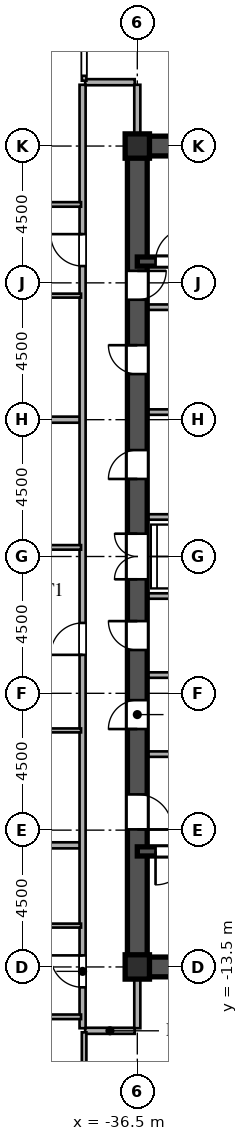
"""IFC4 building model, lengths in metres.
Left out: names, types, materials, properties, quantities, classifications, styles, units other than length and angle.
Written with IfcOpenShell. Run it as: python <this file> out.ifc"""

import sys

from ifc_helpers import new_model, si_unit, direction, frame, frame_2d, origin, origin_2d, place, context, subcontext, project, spatial, rectangle, i_section, extrude, source, transform, mapped, element, fill, save


model = new_model("IFC4")
c1 = context("Model", 3, precision=1e-05, world=origin(), true_north=direction((0.0, 1.0)))
c2 = subcontext(c1, "Body", "Model", "MODEL_VIEW")
j1 = project(units=[si_unit("LENGTHUNIT", "METRE"), si_unit("PLANEANGLEUNIT", "RADIAN")], contexts=[c1])
p1 = place(None, origin())
s1 = spatial("IfcSite", under=j1, at=p1, CompositionType="ELEMENT")
p2 = place(p1, origin())
s2 = spatial("IfcBuilding", under=s1, at=p2, CompositionType="ELEMENT")
p3 = place(p2, frame((0.0, 0.0, 69.3)))
s3 = spatial("IfcBuildingStorey", under=s2, at=p3, CompositionType="ELEMENT", Elevation=69.3)
m1 = source(origin(), c2, "Body", "SweptSolid", [
    extrude(i_section(OverallWidth=0.8, OverallDepth=0.8, WebThickness=0.032, FlangeThickness=0.05, at=origin_2d()), origin(), (0.0, 0.0, 1.0), 3.6),
])
for number, where, z_axis, x_axis in (
    (1, (-36.5, -13.5, 0.0), (0.0, 0.0, 1.0), (1.0, 0.0, 0.0)),
    (2, (-36.5, 13.5, 0.0), (0.0, 0.0, 1.0), (1.0, 0.0, 0.0)),
):
    element("IfcColumn", number, at=place(p3, frame(where, z_axis=z_axis, x_axis=x_axis)), inside=s3, PredefinedType="COLUMN", context=c2, shape_type="MappedRepresentation", body=[
        mapped(m1, transform((0.0, 0.0, 0.0), scale=1.0)),
    ])
for number, where, z_axis, x_axis in (
    (3, (-36.5, -13.5, 0.0), (0.0, 0.0, 1.0), (1.0, 0.0, 0.0)),
    (4, (-36.5, 13.5, 0.0), (0.0, 0.0, 1.0), (1.0, 0.0, 0.0)),
):
    element("IfcWall", number, at=place(p3, frame(where, z_axis=z_axis, x_axis=x_axis)), inside=s3, PredefinedType="SHEAR", context=c2, shape_type="SweptSolid", body=[
        extrude(rectangle(XDim=9.0, YDim=0.65, at=frame_2d((4.5, 0.0))), origin(), (0.0, 0.0, 1.0), 3.38),
    ])
p4 = place(p3, frame((-36.5, -13.65, 0.0), z_axis=(0.0, 0.0, 1.0), x_axis=(0.0, 1.0, 0.0)))
e5 = element("IfcWall", 5, at=p4, inside=s3, PredefinedType="SHEAR", context=c2, shape_type="SweptSolid", body=[
    extrude(rectangle(XDim=7.15, YDim=0.65, at=frame_2d((3.575, 0.0))), origin(), (0.0, 0.0, 1.0), 3.38),
])
p5 = place(p4, frame((4.675, 0.0, 0.0)))
e6 = element("IfcOpeningElement", 6, at=p5, cuts=e5, PredefinedType="OPENING", context=c2, shape_type="SweptSolid", body=[
    extrude(rectangle(XDim=1.15, YDim=2.2, at=frame_2d((0.575, 1.1))), frame((0.0, 0.335, 0.0), z_axis=(0.0, -1.0, 0.0), x_axis=(1.0, 0.0, 0.0)), (0.0, 0.0, 1.0), 0.67),
])
p6 = place(p3, frame((-36.5, -1.3, 0.0), z_axis=(0.0, 0.0, 1.0), x_axis=(0.0, 1.0, 0.0)))
e7 = element("IfcWall", 7, at=p6, inside=s3, PredefinedType="SHEAR", context=c2, shape_type="SweptSolid", body=[
    extrude(rectangle(XDim=2.6, YDim=0.65, at=frame_2d((1.3, 0.0))), origin(), (0.0, 0.0, 1.0), 3.38),
])
p7 = place(p6, frame((0.55, 0.0, 0.0)))
e8 = element("IfcOpeningElement", 8, at=p7, cuts=e7, PredefinedType="OPENING", context=c2, shape_type="SweptSolid", body=[
    extrude(rectangle(XDim=1.5, YDim=2.3, at=frame_2d((0.75, 1.15))), frame((0.0, 0.335, 0.0), z_axis=(0.0, -1.0, 0.0), x_axis=(1.0, 0.0, 0.0)), (0.0, 0.0, 1.0), 0.67),
])
p8 = place(p3, frame((-36.5, 8.2, 0.0), z_axis=(0.0, 0.0, 1.0), x_axis=(0.0, 1.0, 0.0)))
e9 = element("IfcWall", 9, at=p8, inside=s3, PredefinedType="SHEAR", context=c2, shape_type="SweptSolid", body=[
    extrude(rectangle(XDim=5.45, YDim=0.65, at=frame_2d((2.725, 0.0))), origin(), (0.0, 0.0, 1.0), 3.38),
])
p9 = place(p8, frame((0.245, 0.0, 0.0)))
e10 = element("IfcOpeningElement", 10, at=p9, cuts=e9, PredefinedType="OPENING", context=c2, shape_type="SweptSolid", body=[
    extrude(rectangle(XDim=0.95, YDim=2.15, at=frame_2d((0.475, 1.075))), frame((0.0, 0.335, 0.0), z_axis=(0.0, -1.0, 0.0), x_axis=(1.0, 0.0, 0.0)), (0.0, 0.0, 1.0), 0.67),
])
p10 = place(p3, frame((-36.5, -6.5, 0.0), z_axis=(0.0, 0.0, 1.0), x_axis=(0.0, 1.0, 0.0)))
e11 = element("IfcWall", 11, at=p10, inside=s3, PredefinedType="SHEAR", context=c2, shape_type="SweptSolid", body=[
    extrude(rectangle(XDim=2.6, YDim=0.65, at=frame_2d((1.3, 0.0))), origin(), (0.0, 0.0, 1.0), 3.38),
])
p11 = place(p10, frame((0.825, 0.0, 0.0)))
e12 = element("IfcOpeningElement", 12, at=p11, cuts=e11, PredefinedType="OPENING", context=c2, shape_type="SweptSolid", body=[
    extrude(rectangle(XDim=0.95, YDim=2.15, at=frame_2d((0.475, 1.075))), frame((0.0, 0.335, 0.0), z_axis=(0.0, -1.0, 0.0), x_axis=(1.0, 0.0, 0.0)), (0.0, 0.0, 1.0), 0.67),
])
p12 = place(p3, frame((-36.5, -3.9, 0.0), z_axis=(0.0, 0.0, 1.0), x_axis=(0.0, 1.0, 0.0)))
e13 = element("IfcWall", 13, at=p12, inside=s3, PredefinedType="SHEAR", context=c2, shape_type="SweptSolid", body=[
    extrude(rectangle(XDim=2.6, YDim=0.65, at=frame_2d((1.3, 0.0))), origin(), (0.0, 0.0, 1.0), 3.38),
])
p13 = place(p12, frame((0.825, 0.0, 0.0)))
e14 = element("IfcOpeningElement", 14, at=p13, cuts=e13, PredefinedType="OPENING", context=c2, shape_type="SweptSolid", body=[
    extrude(rectangle(XDim=0.95, YDim=2.15, at=frame_2d((0.475, 1.075))), frame((0.0, 0.335, 0.0), z_axis=(0.0, -1.0, 0.0), x_axis=(1.0, 0.0, 0.0)), (0.0, 0.0, 1.0), 0.67),
])
p14 = place(p3, frame((-36.5, 1.3, 0.0), z_axis=(0.0, 0.0, 1.0), x_axis=(0.0, 1.0, 0.0)))
e15 = element("IfcWall", 15, at=p14, inside=s3, PredefinedType="SHEAR", context=c2, shape_type="SweptSolid", body=[
    extrude(rectangle(XDim=3.45, YDim=0.65, at=frame_2d((1.725, 0.0))), origin(), (0.0, 0.0, 1.0), 3.38),
])
p15 = place(p14, frame((1.25, 0.0, 0.0)))
e16 = element("IfcOpeningElement", 16, at=p15, cuts=e15, PredefinedType="OPENING", context=c2, shape_type="SweptSolid", body=[
    extrude(rectangle(XDim=0.95, YDim=2.15, at=frame_2d((0.475, 1.075))), frame((0.0, 0.335, 0.0), z_axis=(0.0, -1.0, 0.0), x_axis=(1.0, 0.0, 0.0)), (0.0, 0.0, 1.0), 0.67),
])
p16 = place(p3, frame((-36.5, 4.75, 0.0), z_axis=(0.0, 0.0, 1.0), x_axis=(0.0, 1.0, 0.0)))
e17 = element("IfcWall", 17, at=p16, inside=s3, PredefinedType="SHEAR", context=c2, shape_type="SweptSolid", body=[
    extrude(rectangle(XDim=3.45, YDim=0.65, at=frame_2d((1.725, 0.0))), origin(), (0.0, 0.0, 1.0), 3.38),
])
p17 = place(p16, frame((1.25, 0.0, 0.0)))
e18 = element("IfcOpeningElement", 18, at=p17, cuts=e17, PredefinedType="OPENING", context=c2, shape_type="SweptSolid", body=[
    extrude(rectangle(XDim=0.95, YDim=2.15, at=frame_2d((0.475, 1.075))), frame((0.0, 0.335, 0.0), z_axis=(0.0, -1.0, 0.0), x_axis=(1.0, 0.0, 0.0)), (0.0, 0.0, 1.0), 0.67),
])
p18 = place(p3, frame((-36.5, -9.7, 0.0), z_axis=(0.0, 0.0, 1.0), x_axis=(1.0, 0.0, 0.0)))
e19 = element("IfcWall", 19, at=p18, inside=s3, PredefinedType="SHEAR", context=c2, shape_type="SweptSolid", body=[
    extrude(rectangle(XDim=9.0, YDim=0.3, at=frame_2d((4.5, 0.0))), origin(), (0.0, 0.0, 1.0), 3.38),
])
p19 = place(p18, frame((0.6, 0.0, 0.0)))
e20 = element("IfcOpeningElement", 20, at=p19, cuts=e19, PredefinedType="OPENING", context=c2, shape_type="SweptSolid", body=[
    extrude(rectangle(XDim=1.1, YDim=2.2, at=frame_2d((0.55, 1.1))), frame((0.0, 0.16, 0.0), z_axis=(0.0, -1.0, 0.0), x_axis=(1.0, 0.0, 0.0)), (0.0, 0.0, 1.0), 0.32),
])
p20 = place(p3, frame((-36.5, 9.7, 0.0), z_axis=(0.0, 0.0, 1.0), x_axis=(1.0, 0.0, 0.0)))
e21 = element("IfcWall", 21, at=p20, inside=s3, PredefinedType="SHEAR", context=c2, shape_type="SweptSolid", body=[
    extrude(rectangle(XDim=9.0, YDim=0.3, at=frame_2d((4.5, 0.0))), origin(), (0.0, 0.0, 1.0), 3.38),
])
p21 = place(p20, frame((0.6, 0.0, 0.0)))
e22 = element("IfcOpeningElement", 22, at=p21, cuts=e21, PredefinedType="OPENING", context=c2, shape_type="SweptSolid", body=[
    extrude(rectangle(XDim=1.1, YDim=2.2, at=frame_2d((0.55, 1.1))), frame((0.0, 0.16, 0.0), z_axis=(0.0, -1.0, 0.0), x_axis=(1.0, 0.0, 0.0)), (0.0, 0.0, 1.0), 0.32),
])
for number, where, z_axis, x_axis in (
    (23, (-36.15, -6.5, 0.0), (0.0, 0.0, 1.0), (1.0, 0.0, 0.0)),
    (24, (-36.15, 8.2, 0.0), (0.0, 0.0, 1.0), (1.0, 0.0, 0.0)),
):
    element("IfcWall", number, at=place(p3, frame(where, z_axis=z_axis, x_axis=x_axis)), inside=s3, PredefinedType="PARTITIONING", context=c2, shape_type="SweptSolid", body=[
        extrude(rectangle(XDim=5.7, YDim=0.18, at=frame_2d((2.85, 0.0))), origin(), (0.0, 0.0, 1.0), 3.38),
    ])
for number, where, z_axis, x_axis in (
    (25, (-36.15, -1.3, 0.0), (0.0, 0.0, 1.0), (1.0, 0.0, 0.0)),
    (26, (-36.15, 1.3, 0.0), (0.0, 0.0, 1.0), (1.0, 0.0, 0.0)),
    (27, (-36.15, -3.9, 0.0), (0.0, 0.0, 1.0), (1.0, 0.0, 0.0)),
    (28, (-36.15, 4.75, 0.0), (0.0, 0.0, 1.0), (1.0, 0.0, 0.0)),
):
    element("IfcWall", number, at=place(p3, frame(where, z_axis=z_axis, x_axis=x_axis)), inside=s3, PredefinedType="PARTITIONING", context=c2, shape_type="SweptSolid", body=[
        extrude(rectangle(XDim=2.95, YDim=0.18, at=frame_2d((1.475, 0.0))), origin(), (0.0, 0.0, 1.0), 3.38),
    ])
p22 = place(p3, frame((-38.215, -15.6, 0.0), z_axis=(0.0, 0.0, 1.0), x_axis=(1.0, 0.0, 0.0)))
e29 = element("IfcWall", 29, at=p22, inside=s3, PredefinedType="PARTITIONING", context=c2, shape_type="SweptSolid", body=[
    extrude(rectangle(XDim=1.63, YDim=0.2, at=frame_2d((0.815, 0.0))), origin(), (0.0, 0.0, 1.0), 3.38),
])
p23 = place(p3, frame((-44.4, -15.14, 0.0), z_axis=(0.0, 0.0, 1.0), x_axis=(1.0, 0.0, 0.0)))
e30 = element("IfcWall", 30, at=p23, inside=s3, PredefinedType="PARTITIONING", context=c2, shape_type="SweptSolid", body=[
    extrude(rectangle(XDim=6.05, YDim=0.15, at=frame_2d((3.025, 0.0))), origin(), (0.0, 0.0, 1.0), 3.38),
])
p24 = place(p23, frame((2.55, 0.0, 0.0)))
e31 = element("IfcOpeningElement", 31, at=p24, cuts=e30, PredefinedType="OPENING", context=c2, shape_type="SweptSolid", body=[
    extrude(rectangle(XDim=0.95, YDim=2.15, at=frame_2d((0.475, 1.075))), frame((0.0, 0.085, 0.0), z_axis=(0.0, -1.0, 0.0), x_axis=(1.0, 0.0, 0.0)), (0.0, 0.0, 1.0), 0.17),
])
p25 = place(p3, frame((-44.4, -12.14, 0.0), z_axis=(0.0, 0.0, 1.0), x_axis=(1.0, 0.0, 0.0)))
e32 = element("IfcWall", 32, at=p25, inside=s3, PredefinedType="PARTITIONING", context=c2, shape_type="SweptSolid", body=[
    extrude(rectangle(XDim=6.05, YDim=0.13, at=frame_2d((3.025, 0.0))), origin(), (0.0, 0.0, 1.0), 3.38),
])
p26 = place(p25, frame((2.585, 0.0, 0.0)))
e33 = element("IfcOpeningElement", 33, at=p26, cuts=e32, PredefinedType="OPENING", context=c2, shape_type="SweptSolid", body=[
    extrude(rectangle(XDim=0.88, YDim=2.1, at=frame_2d((0.44, 1.05))), frame((0.0, 0.075, 0.0), z_axis=(0.0, -1.0, 0.0), x_axis=(1.0, 0.0, 0.0)), (0.0, 0.0, 1.0), 0.15),
])
p27 = place(p3, frame((-66.568, -9.5, 0.0), z_axis=(0.0, 0.0, 1.0), x_axis=(1.0, 0.0, 0.0)))
e34 = element("IfcWall", 34, at=p27, inside=s3, PredefinedType="PARTITIONING", context=c2, shape_type="SweptSolid", body=[
    extrude(rectangle(XDim=28.188, YDim=0.2, at=frame_2d((14.094, 0.0))), origin(), (0.0, 0.0, 1.0), 3.38),
])
p28 = place(p3, frame((-44.4, -5.72, 0.0), z_axis=(0.0, 0.0, 1.0), x_axis=(1.0, 0.0, 0.0)))
e35 = element("IfcWall", 35, at=p28, inside=s3, PredefinedType="PARTITIONING", context=c2, shape_type="SweptSolid", body=[
    extrude(rectangle(XDim=6.05, YDim=0.13, at=frame_2d((3.025, 0.0))), origin(), (0.0, 0.0, 1.0), 3.38),
])
p29 = place(p28, frame((2.585, 0.0, 0.0)))
e36 = element("IfcOpeningElement", 36, at=p29, cuts=e35, PredefinedType="OPENING", context=c2, shape_type="SweptSolid", body=[
    extrude(rectangle(XDim=0.88, YDim=2.1, at=frame_2d((0.44, 1.05))), frame((0.0, 0.075, 0.0), z_axis=(0.0, -1.0, 0.0), x_axis=(1.0, 0.0, 0.0)), (0.0, 0.0, 1.0), 0.15),
])
p30 = place(p3, frame((-44.4, 0.3, 0.0), z_axis=(0.0, 0.0, 1.0), x_axis=(1.0, 0.0, 0.0)))
e37 = element("IfcWall", 37, at=p30, inside=s3, PredefinedType="PARTITIONING", context=c2, shape_type="SweptSolid", body=[
    extrude(rectangle(XDim=6.05, YDim=0.15, at=frame_2d((3.025, 0.0))), origin(), (0.0, 0.0, 1.0), 3.38),
])
p31 = place(p30, frame((2.55, 0.0, 0.0)))
e38 = element("IfcOpeningElement", 38, at=p31, cuts=e37, PredefinedType="OPENING", context=c2, shape_type="SweptSolid", body=[
    extrude(rectangle(XDim=0.95, YDim=2.15, at=frame_2d((0.475, 1.075))), frame((0.0, 0.085, 0.0), z_axis=(0.0, -1.0, 0.0), x_axis=(1.0, 0.0, 0.0)), (0.0, 0.0, 1.0), 0.17),
])
p32 = place(p3, frame((-54.52, 4.5, 0.0), z_axis=(0.0, 0.0, 1.0), x_axis=(1.0, 0.0, 0.0)))
e39 = element("IfcWall", 39, at=p32, inside=s3, PredefinedType="PARTITIONING", context=c2, shape_type="SweptSolid", body=[
    extrude(rectangle(XDim=16.14, YDim=0.2, at=frame_2d((8.07, 0.0))), origin(), (0.0, 0.0, 1.0), 2.68),
])
p33 = place(p3, frame((-44.4, 8.58, 0.0), z_axis=(0.0, 0.0, 1.0), x_axis=(1.0, 0.0, 0.0)))
e40 = element("IfcWall", 40, at=p33, inside=s3, PredefinedType="PARTITIONING", context=c2, shape_type="SweptSolid", body=[
    extrude(rectangle(XDim=6.05, YDim=0.13, at=frame_2d((3.025, 0.0))), origin(), (0.0, 0.0, 1.0), 3.38),
])
p34 = place(p33, frame((2.585, 0.0, 0.0)))
e41 = element("IfcOpeningElement", 41, at=p34, cuts=e40, PredefinedType="OPENING", context=c2, shape_type="SweptSolid", body=[
    extrude(rectangle(XDim=0.88, YDim=2.1, at=frame_2d((0.44, 1.05))), frame((0.0, 0.075, 0.0), z_axis=(0.0, -1.0, 0.0), x_axis=(1.0, 0.0, 0.0)), (0.0, 0.0, 1.0), 0.15),
])
p35 = place(p3, frame((-44.4, 11.58, 0.0), z_axis=(0.0, 0.0, 1.0), x_axis=(1.0, 0.0, 0.0)))
e42 = element("IfcWall", 42, at=p35, inside=s3, PredefinedType="PARTITIONING", context=c2, shape_type="SweptSolid", body=[
    extrude(rectangle(XDim=6.05, YDim=0.15, at=frame_2d((3.025, 0.0))), origin(), (0.0, 0.0, 1.0), 3.38),
])
p36 = place(p35, frame((2.55, 0.0, 0.0)))
e43 = element("IfcOpeningElement", 43, at=p36, cuts=e42, PredefinedType="OPENING", context=c2, shape_type="SweptSolid", body=[
    extrude(rectangle(XDim=0.95, YDim=2.15, at=frame_2d((0.475, 1.075))), frame((0.0, 0.085, 0.0), z_axis=(0.0, -1.0, 0.0), x_axis=(1.0, 0.0, 0.0)), (0.0, 0.0, 1.0), 0.17),
])
p37 = place(p3, frame((-38.215, 15.6, 0.0), z_axis=(0.0, 0.0, 1.0), x_axis=(1.0, 0.0, 0.0)))
e44 = element("IfcWall", 44, at=p37, inside=s3, PredefinedType="PARTITIONING", context=c2, shape_type="SweptSolid", body=[
    extrude(rectangle(XDim=1.63, YDim=0.2, at=frame_2d((0.815, 0.0))), origin(), (0.0, 0.0, 1.0), 3.38),
])
p38 = place(p3, frame((-38.3, -15.515, 0.0), z_axis=(0.0, 0.0, 1.0), x_axis=(0.0, 1.0, 0.0)))
e45 = element("IfcWall", 45, at=p38, inside=s3, PredefinedType="PARTITIONING", context=c2, shape_type="SweptSolid", body=[
    extrude(rectangle(XDim=31.03, YDim=0.2, at=frame_2d((15.515, 0.0))), origin(), (0.0, 0.0, 1.0), 3.38),
])
p39 = place(p38, frame((1.345, 0.0, 0.0)))
e46 = element("IfcOpeningElement", 46, at=p39, cuts=e45, PredefinedType="OPENING", context=c2, shape_type="SweptSolid", body=[
    extrude(rectangle(XDim=1.05, YDim=2.25, at=frame_2d((0.525, 1.125))), frame((0.0, 0.11, 0.0), z_axis=(0.0, -1.0, 0.0), x_axis=(1.0, 0.0, 0.0)), (0.0, 0.0, 1.0), 0.22),
])
p40 = place(p38, frame((12.28, 0.0, 0.0)))
e47 = element("IfcOpeningElement", 47, at=p40, cuts=e45, PredefinedType="OPENING", context=c2, shape_type="SweptSolid", body=[
    extrude(rectangle(XDim=1.05, YDim=2.25, at=frame_2d((0.525, 1.125))), frame((0.0, 0.11, 0.0), z_axis=(0.0, -1.0, 0.0), x_axis=(1.0, 0.0, 0.0)), (0.0, 0.0, 1.0), 0.22),
])
p41 = place(p38, frame((25.067, 0.0, 0.0)))
e48 = element("IfcOpeningElement", 48, at=p41, cuts=e45, PredefinedType="OPENING", context=c2, shape_type="SweptSolid", body=[
    extrude(rectangle(XDim=1.05, YDim=2.25, at=frame_2d((0.525, 1.125))), frame((0.0, 0.11, 0.0), z_axis=(0.0, -1.0, 0.0), x_axis=(1.0, 0.0, 0.0)), (0.0, 0.0, 1.0), 0.22),
])
p42 = place(p3, frame((-38.25, -22.273, 0.0), z_axis=(0.0, 0.0, 1.0), x_axis=(0.0, 1.0, 0.0)))
e49 = element("IfcWall", 49, at=p42, inside=s3, PredefinedType="PARTITIONING", context=c2, shape_type="SweptSolid", body=[
    extrude(rectangle(XDim=6.623, YDim=0.15, at=frame_2d((3.312, 0.0))), origin(), (0.0, 0.0, 1.0), 3.38),
])
p43 = place(p42, frame((0.929, 0.0, 0.0)))
e50 = element("IfcOpeningElement", 50, at=p43, cuts=e49, PredefinedType="OPENING", context=c2, shape_type="SweptSolid", body=[
    extrude(rectangle(XDim=0.95, YDim=2.15, at=frame_2d((0.475, 1.075))), frame((0.0, 0.085, 0.0), z_axis=(0.0, -1.0, 0.0), x_axis=(1.0, 0.0, 0.0)), (0.0, 0.0, 1.0), 0.17),
])
p44 = place(p42, frame((4.248, 0.0, 0.0)))
e51 = element("IfcOpeningElement", 51, at=p44, cuts=e49, PredefinedType="OPENING", context=c2, shape_type="SweptSolid", body=[
    extrude(rectangle(XDim=0.95, YDim=2.15, at=frame_2d((0.475, 1.075))), frame((0.0, 0.085, 0.0), z_axis=(0.0, -1.0, 0.0), x_axis=(1.0, 0.0, 0.0)), (0.0, 0.0, 1.0), 0.17),
])
p45 = place(p3, frame((-38.25, 15.65, 0.0), z_axis=(0.0, 0.0, 1.0), x_axis=(0.0, 1.0, 0.0)))
e52 = element("IfcWall", 52, at=p45, inside=s3, PredefinedType="PARTITIONING", context=c2, shape_type="SweptSolid", body=[
    extrude(rectangle(XDim=6.623, YDim=0.15, at=frame_2d((3.312, 0.0))), origin(), (0.0, 0.0, 1.0), 3.38),
])
p46 = place(p45, frame((0.16, 0.0, 0.0)))
e53 = element("IfcOpeningElement", 53, at=p46, cuts=e52, PredefinedType="OPENING", context=c2, shape_type="SweptSolid", body=[
    extrude(rectangle(XDim=0.95, YDim=2.15, at=frame_2d((0.475, 1.075))), frame((0.0, 0.085, 0.0), z_axis=(0.0, -1.0, 0.0), x_axis=(1.0, 0.0, 0.0)), (0.0, 0.0, 1.0), 0.17),
])
for number, where, z_axis, x_axis in (
    (54, (-36.5, -15.515, 0.0), (0.0, 0.0, 1.0), (0.0, 1.0, 0.0)),
    (55, (-36.5, 13.83, 0.0), (0.0, 0.0, 1.0), (0.0, 1.0, 0.0)),
):
    element("IfcWall", number, at=place(p3, frame(where, z_axis=z_axis, x_axis=x_axis)), inside=s3, PredefinedType="PARTITIONING", context=c2, shape_type="SweptSolid", body=[
        extrude(rectangle(XDim=1.685, YDim=0.2, at=frame_2d((0.842, 0.0))), origin(), (0.0, 0.0, 1.0), 2.68),
    ])
m2 = source(origin(), c2, "Body", "SweptSolid", [
    extrude(rectangle(XDim=1.15, YDim=2.2, at=frame_2d((0.575, 1.1))), frame((0.0, 0.025, 0.0), z_axis=(0.0, -1.0, 0.0), x_axis=(1.0, 0.0, 0.0)), (0.0, 0.0, 1.0), 0.05),
])
p47 = place(p5, frame((1.15, 0.0, 0.0), z_axis=(0.0, 0.0, 1.0), x_axis=(-1.0, 0.0, 0.0)))
e56 = element("IfcDoor", 56, at=p47, inside=s3, OperationType="SINGLE_SWING_LEFT", PredefinedType="DOOR", context=c2, shape_type="MappedRepresentation", body=[
    mapped(m2, transform((0.0, 0.0, 0.0), scale=1.0)),
])
fill(e6, e56)
m3 = source(origin(), c2, "Body", "SweptSolid", [
    extrude(rectangle(XDim=1.5, YDim=2.3, at=frame_2d((0.75, 1.15))), frame((0.0, 0.025, 0.0), z_axis=(0.0, -1.0, 0.0), x_axis=(1.0, 0.0, 0.0)), (0.0, 0.0, 1.0), 0.05),
])
p48 = place(p7, origin())
e57 = element("IfcDoor", 57, at=p48, inside=s3, OperationType="DOUBLE_SWING_LEFT", PredefinedType="DOOR", context=c2, shape_type="MappedRepresentation", body=[
    mapped(m3, transform((0.0, 0.0, 0.0), scale=1.0)),
])
fill(e8, e57)
m4 = source(origin(), c2, "Body", "SweptSolid", [
    extrude(rectangle(XDim=0.95, YDim=2.15, at=frame_2d((0.475, 1.075))), frame((0.0, 0.025, 0.0), z_axis=(0.0, -1.0, 0.0), x_axis=(1.0, 0.0, 0.0)), (0.0, 0.0, 1.0), 0.05),
])
p49 = place(p9, frame((0.95, 0.0, 0.0), z_axis=(0.0, 0.0, 1.0), x_axis=(-1.0, 0.0, 0.0)))
e58 = element("IfcDoor", 58, at=p49, inside=s3, OperationType="SINGLE_SWING_RIGHT", PredefinedType="DOOR", context=c2, shape_type="MappedRepresentation", body=[
    mapped(m4, transform((0.0, 0.0, 0.0), scale=1.0)),
])
fill(e10, e58)
p50 = place(p11, origin())
e59 = element("IfcDoor", 59, at=p50, inside=s3, OperationType="SINGLE_SWING_LEFT", PredefinedType="DOOR", context=c2, shape_type="MappedRepresentation", body=[
    mapped(m4, transform((0.0, 0.0, 0.0), scale=1.0)),
])
fill(e12, e59)
p51 = place(p13, origin())
e60 = element("IfcDoor", 60, at=p51, inside=s3, OperationType="SINGLE_SWING_RIGHT", PredefinedType="DOOR", context=c2, shape_type="MappedRepresentation", body=[
    mapped(m4, transform((0.0, 0.0, 0.0), scale=1.0)),
])
fill(e14, e60)
p52 = place(p15, origin())
e61 = element("IfcDoor", 61, at=p52, inside=s3, OperationType="SINGLE_SWING_LEFT", PredefinedType="DOOR", context=c2, shape_type="MappedRepresentation", body=[
    mapped(m4, transform((0.0, 0.0, 0.0), scale=1.0)),
])
fill(e16, e61)
p53 = place(p17, origin())
e62 = element("IfcDoor", 62, at=p53, inside=s3, OperationType="SINGLE_SWING_RIGHT", PredefinedType="DOOR", context=c2, shape_type="MappedRepresentation", body=[
    mapped(m4, transform((0.0, 0.0, 0.0), scale=1.0)),
])
fill(e18, e62)
m5 = source(origin(), c2, "Body", "SweptSolid", [
    extrude(rectangle(XDim=1.1, YDim=2.2, at=frame_2d((0.55, 1.1))), frame((0.0, 0.025, 0.0), z_axis=(0.0, -1.0, 0.0), x_axis=(1.0, 0.0, 0.0)), (0.0, 0.0, 1.0), 0.05),
])
p54 = place(p19, frame((1.1, 0.0, 0.0), z_axis=(0.0, 0.0, 1.0), x_axis=(-1.0, 0.0, 0.0)))
e63 = element("IfcDoor", 63, at=p54, inside=s3, OperationType="SINGLE_SWING_LEFT", PredefinedType="DOOR", context=c2, shape_type="MappedRepresentation", body=[
    mapped(m5, transform((0.0, 0.0, 0.0), scale=1.0)),
])
fill(e20, e63)
p55 = place(p21, origin())
e64 = element("IfcDoor", 64, at=p55, inside=s3, OperationType="SINGLE_SWING_RIGHT", PredefinedType="DOOR", context=c2, shape_type="MappedRepresentation", body=[
    mapped(m5, transform((0.0, 0.0, 0.0), scale=1.0)),
])
fill(e22, e64)
m6 = source(origin(), c2, "Body", "SweptSolid", [
    extrude(rectangle(XDim=1.05, YDim=2.25, at=frame_2d((0.525, 1.125))), frame((0.0, 0.025, 0.0), z_axis=(0.0, -1.0, 0.0), x_axis=(1.0, 0.0, 0.0)), (0.0, 0.0, 1.0), 0.05),
])
p56 = place(p39, origin())
e65 = element("IfcDoor", 65, at=p56, inside=s3, OperationType="SINGLE_SWING_RIGHT", PredefinedType="DOOR", context=c2, shape_type="MappedRepresentation", body=[
    mapped(m6, transform((0.0, 0.0, 0.0), scale=1.0)),
])
fill(e46, e65)
p57 = place(p40, origin())
e66 = element("IfcDoor", 66, at=p57, inside=s3, OperationType="SINGLE_SWING_LEFT", PredefinedType="DOOR", context=c2, shape_type="MappedRepresentation", body=[
    mapped(m6, transform((0.0, 0.0, 0.0), scale=1.0)),
])
fill(e47, e66)
p58 = place(p41, origin())
e67 = element("IfcDoor", 67, at=p58, inside=s3, OperationType="SINGLE_SWING_RIGHT", PredefinedType="DOOR", context=c2, shape_type="MappedRepresentation", body=[
    mapped(m6, transform((0.0, 0.0, 0.0), scale=1.0)),
])
fill(e48, e67)
save(model, sys.argv[1])
